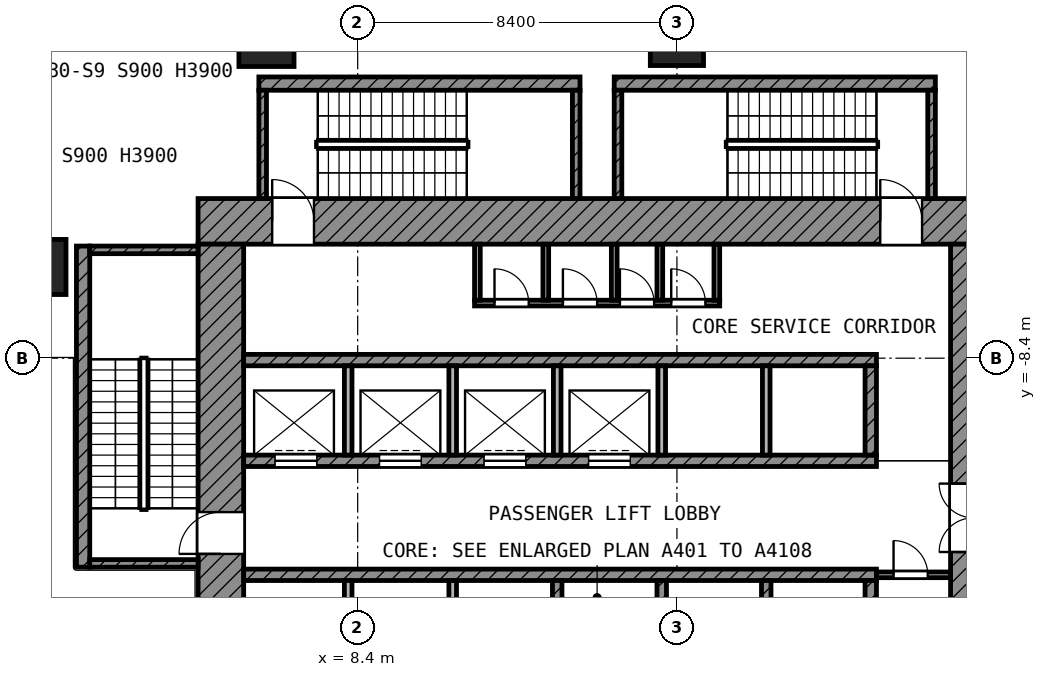
"""IFC4 building model, lengths in metres.
Left out: names, types, materials, properties, quantities, classifications, styles, units other than length and angle.
Written with IfcOpenShell. Run it as: python <this file> out.ifc"""

import sys

from ifc_helpers import new_model, si_unit, direction, frame, frame_2d, origin, origin_2d, place, context, subcontext, project, spatial, rectangle, extrude, element, fill, save


model = new_model("IFC4")
c1 = context("Model", 3, precision=1e-05, world=origin(), true_north=direction((0.0, 1.0)))
c2 = subcontext(c1, "Body", "Model", "MODEL_VIEW")
j1 = project(units=[si_unit("LENGTHUNIT", "METRE"), si_unit("PLANEANGLEUNIT", "RADIAN")], contexts=[c1])
p1 = place(None, origin())
s1 = spatial("IfcSite", under=j1, at=p1, CompositionType="ELEMENT")
p2 = place(p1, origin())
s2 = spatial("IfcBuilding", under=s1, at=p2, CompositionType="ELEMENT")
p3 = place(p2, frame((0.0, 0.0, 29.0)))
s3 = spatial("IfcBuildingStorey", under=s2, at=p3, CompositionType="ELEMENT", Elevation=29.0)
p4 = place(p3, frame((6.0, 0.0, 0.0), z_axis=(0.0, 0.0, 1.0), x_axis=(1.0, 0.0, 0.0)))
e1 = element("IfcColumn", 1, at=p4, inside=s3, PredefinedType="COLUMN", context=c2, shape_type="SweptSolid", body=[
    extrude(rectangle(XDim=1.45, YDim=1.45, at=origin_2d()), origin(), (0.0, 0.0, 1.0), 5.2),
])
p5 = place(p3, frame((16.8, 0.0, 0.0), z_axis=(0.0, 0.0, 1.0), x_axis=(1.0, 0.0, 0.0)))
e2 = element("IfcColumn", 2, at=p5, inside=s3, PredefinedType="COLUMN", context=c2, shape_type="SweptSolid", body=[
    extrude(rectangle(XDim=1.4, YDim=1.4, at=origin_2d()), origin(), (0.0, 0.0, 1.0), 5.2),
])
p6 = place(p3, frame((0.0, -6.0, 0.0), z_axis=(0.0, 0.0, 1.0), x_axis=(1.0, 0.0, 0.0)))
e3 = element("IfcColumn", 3, at=p6, inside=s3, PredefinedType="COLUMN", context=c2, shape_type="SweptSolid", body=[
    extrude(rectangle(XDim=1.45, YDim=1.45, at=origin_2d()), origin(), (0.0, 0.0, 1.0), 5.2),
])
p7 = place(p3, frame((2.062, 3.85, 0.0), z_axis=(0.0, 0.0, 1.0), x_axis=(-0.707106781187, -0.707106781187, 0.0)))
e4 = element("IfcWall", 4, at=p7, inside=s3, PredefinedType="SOLIDWALL", context=c2, shape_type="SweptSolid", body=[
    extrude(rectangle(XDim=8.361, YDim=0.3, at=frame_2d((4.181, 0.0))), origin(), (0.0, 0.0, 1.0), 4.7),
])
p8 = place(p7, frame((0.259, 0.0, 0.9)))
e5 = element("IfcOpeningElement", 5, at=p8, cuts=e4, PredefinedType="OPENING", context=c2, shape_type="SweptSolid", body=[
    extrude(rectangle(XDim=3.6, YDim=3.0, at=frame_2d((1.8, 1.5))), frame((0.0, 0.16, 0.0), z_axis=(0.0, -1.0, 0.0), x_axis=(1.0, 0.0, 0.0)), (0.0, 0.0, 1.0), 0.32),
])
p9 = place(p7, frame((4.502, 0.0, 0.9)))
e6 = element("IfcOpeningElement", 6, at=p9, cuts=e4, PredefinedType="OPENING", context=c2, shape_type="SweptSolid", body=[
    extrude(rectangle(XDim=3.6, YDim=3.0, at=frame_2d((1.8, 1.5))), frame((0.0, 0.16, 0.0), z_axis=(0.0, -1.0, 0.0), x_axis=(1.0, 0.0, 0.0)), (0.0, 0.0, 1.0), 0.32),
])
p10 = place(p3, frame((4.2, -4.8, 0.0), z_axis=(0.0, 0.0, 1.0), x_axis=(1.0, 0.0, 0.0)))
e7 = element("IfcWall", 7, at=p10, inside=s3, PredefinedType="SHEAR", context=c2, shape_type="SweptSolid", body=[
    extrude(rectangle(XDim=21.0, YDim=1.2, at=frame_2d((10.5, 0.0))), origin(), (0.0, 0.0, 1.0), 4.7),
])
p11 = place(p10, frame((1.95, 0.0, 0.0)))
e8 = element("IfcOpeningElement", 8, at=p11, cuts=e7, PredefinedType="OPENING", context=c2, shape_type="SweptSolid", body=[
    extrude(rectangle(XDim=1.1, YDim=2.1, at=frame_2d((0.55, 1.05))), frame((0.0, 0.61, 0.0), z_axis=(0.0, -1.0, 0.0), x_axis=(1.0, 0.0, 0.0)), (0.0, 0.0, 1.0), 1.22),
])
p12 = place(p10, frame((17.95, 0.0, 0.0)))
e9 = element("IfcOpeningElement", 9, at=p12, cuts=e7, PredefinedType="OPENING", context=c2, shape_type="SweptSolid", body=[
    extrude(rectangle(XDim=1.1, YDim=2.1, at=frame_2d((0.55, 1.05))), frame((0.0, 0.61, 0.0), z_axis=(0.0, -1.0, 0.0), x_axis=(1.0, 0.0, 0.0)), (0.0, 0.0, 1.0), 1.22),
])
p13 = place(p3, frame((4.8, -25.2, 0.0), z_axis=(0.0, 0.0, 1.0), x_axis=(0.0, 1.0, 0.0)))
e10 = element("IfcWall", 10, at=p13, inside=s3, PredefinedType="SHEAR", context=c2, shape_type="SweptSolid", body=[
    extrude(rectangle(XDim=19.8, YDim=1.2, at=frame_2d((9.9, 0.0))), origin(), (0.0, 0.0, 1.0), 4.7),
])
p14 = place(p13, frame((11.65, 0.0, 0.0)))
e11 = element("IfcOpeningElement", 11, at=p14, cuts=e10, PredefinedType="OPENING", context=c2, shape_type="SweptSolid", body=[
    extrude(rectangle(XDim=1.1, YDim=2.1, at=frame_2d((0.55, 1.05))), frame((0.0, 0.61, 0.0), z_axis=(0.0, -1.0, 0.0), x_axis=(1.0, 0.0, 0.0)), (0.0, 0.0, 1.0), 1.22),
])
p15 = place(p13, frame((2.35, 0.0, 0.0)))
e12 = element("IfcOpeningElement", 12, at=p15, cuts=e10, PredefinedType="OPENING", context=c2, shape_type="SweptSolid", body=[
    extrude(rectangle(XDim=1.1, YDim=2.1, at=frame_2d((0.55, 1.05))), frame((0.0, 0.61, 0.0), z_axis=(0.0, -1.0, 0.0), x_axis=(1.0, 0.0, 0.0)), (0.0, 0.0, 1.0), 1.22),
])
p16 = place(p3, frame((24.6, -24.0, 0.0), z_axis=(0.0, 0.0, 1.0), x_axis=(0.0, 1.0, 0.0)))
e13 = element("IfcWall", 13, at=p16, inside=s3, PredefinedType="SHEAR", context=c2, shape_type="SweptSolid", body=[
    extrude(rectangle(XDim=18.6, YDim=1.2, at=frame_2d((9.3, 0.0))), origin(), (0.0, 0.0, 1.0), 4.7),
])
p17 = place(p16, frame((10.5, 0.0, 0.0)))
e14 = element("IfcOpeningElement", 14, at=p17, cuts=e13, PredefinedType="OPENING", context=c2, shape_type="SweptSolid", body=[
    extrude(rectangle(XDim=1.8, YDim=2.1, at=frame_2d((0.9, 1.05))), frame((0.0, 0.61, 0.0), z_axis=(0.0, -1.0, 0.0), x_axis=(1.0, 0.0, 0.0)), (0.0, 0.0, 1.0), 1.22),
])
p18 = place(p3, frame((5.4, -8.45, 0.0), z_axis=(0.0, 0.0, 1.0), x_axis=(1.0, 0.0, 0.0)))
e15 = element("IfcWall", 15, at=p18, inside=s3, PredefinedType="SHEAR", context=c2, shape_type="SweptSolid", body=[
    extrude(rectangle(XDim=16.65, YDim=0.3, at=frame_2d((8.325, 0.0))), origin(), (0.0, 0.0, 1.0), 4.7),
])
p19 = place(p3, frame((5.4, -11.1, 0.0), z_axis=(0.0, 0.0, 1.0), x_axis=(1.0, 0.0, 0.0)))
e16 = element("IfcWall", 16, at=p19, inside=s3, PredefinedType="SHEAR", context=c2, shape_type="SweptSolid", body=[
    extrude(rectangle(XDim=16.65, YDim=0.3, at=frame_2d((8.325, 0.0))), origin(), (0.0, 0.0, 1.0), 4.7),
])
p20 = place(p19, frame((0.825, 0.0, 0.0)))
e17 = element("IfcOpeningElement", 17, at=p20, cuts=e16, PredefinedType="OPENING", context=c2, shape_type="SweptSolid", body=[
    extrude(rectangle(XDim=1.1, YDim=2.1, at=frame_2d((0.55, 1.05))), frame((0.0, 0.16, 0.0), z_axis=(0.0, -1.0, 0.0), x_axis=(1.0, 0.0, 0.0)), (0.0, 0.0, 1.0), 0.32),
])
p21 = place(p19, frame((3.575, 0.0, 0.0)))
e18 = element("IfcOpeningElement", 18, at=p21, cuts=e16, PredefinedType="OPENING", context=c2, shape_type="SweptSolid", body=[
    extrude(rectangle(XDim=1.1, YDim=2.1, at=frame_2d((0.55, 1.05))), frame((0.0, 0.16, 0.0), z_axis=(0.0, -1.0, 0.0), x_axis=(1.0, 0.0, 0.0)), (0.0, 0.0, 1.0), 0.32),
])
p22 = place(p19, frame((6.325, 0.0, 0.0)))
e19 = element("IfcOpeningElement", 19, at=p22, cuts=e16, PredefinedType="OPENING", context=c2, shape_type="SweptSolid", body=[
    extrude(rectangle(XDim=1.1, YDim=2.1, at=frame_2d((0.55, 1.05))), frame((0.0, 0.16, 0.0), z_axis=(0.0, -1.0, 0.0), x_axis=(1.0, 0.0, 0.0)), (0.0, 0.0, 1.0), 0.32),
])
p23 = place(p19, frame((9.075, 0.0, 0.0)))
e20 = element("IfcOpeningElement", 20, at=p23, cuts=e16, PredefinedType="OPENING", context=c2, shape_type="SweptSolid", body=[
    extrude(rectangle(XDim=1.1, YDim=2.1, at=frame_2d((0.55, 1.05))), frame((0.0, 0.16, 0.0), z_axis=(0.0, -1.0, 0.0), x_axis=(1.0, 0.0, 0.0)), (0.0, 0.0, 1.0), 0.32),
])
p24 = place(p3, frame((5.4, -14.1, 0.0), z_axis=(0.0, 0.0, 1.0), x_axis=(1.0, 0.0, 0.0)))
e21 = element("IfcWall", 21, at=p24, inside=s3, PredefinedType="SHEAR", context=c2, shape_type="SweptSolid", body=[
    extrude(rectangle(XDim=16.65, YDim=0.3, at=frame_2d((8.325, 0.0))), origin(), (0.0, 0.0, 1.0), 4.7),
])
p25 = place(p3, frame((21.9, -10.95, 0.0), z_axis=(0.0, 0.0, 1.0), x_axis=(0.0, 1.0, 0.0)))
e22 = element("IfcWall", 22, at=p25, inside=s3, PredefinedType="SHEAR", context=c2, shape_type="SweptSolid", body=[
    extrude(rectangle(XDim=2.35, YDim=0.3, at=frame_2d((1.175, 0.0))), origin(), (0.0, 0.0, 1.0), 4.7),
])
p26 = place(p3, frame((21.9, -16.6, 0.0), z_axis=(0.0, 0.0, 1.0), x_axis=(0.0, 1.0, 0.0)))
e23 = element("IfcWall", 23, at=p26, inside=s3, PredefinedType="SHEAR", context=c2, shape_type="SweptSolid", body=[
    extrude(rectangle(XDim=2.35, YDim=0.3, at=frame_2d((1.175, 0.0))), origin(), (0.0, 0.0, 1.0), 4.7),
])
for number, where, z_axis, x_axis in (
    (24, (8.15, -10.95, 0.0), (0.0, 0.0, 1.0), (0.0, 1.0, 0.0)),
    (25, (10.9, -10.95, 0.0), (0.0, 0.0, 1.0), (0.0, 1.0, 0.0)),
    (26, (13.65, -10.95, 0.0), (0.0, 0.0, 1.0), (0.0, 1.0, 0.0)),
    (27, (16.4, -10.95, 0.0), (0.0, 0.0, 1.0), (0.0, 1.0, 0.0)),
    (28, (19.15, -10.95, 0.0), (0.0, 0.0, 1.0), (0.0, 1.0, 0.0)),
):
    element("IfcWall", number, at=place(p3, frame(where, z_axis=z_axis, x_axis=x_axis)), inside=s3, PredefinedType="PARTITIONING", context=c2, shape_type="SweptSolid", body=[
        extrude(rectangle(XDim=2.35, YDim=0.2, at=frame_2d((1.175, 0.0))), origin(), (0.0, 0.0, 1.0), 4.7),
    ])
for number, where, z_axis, x_axis in (
    (29, (8.15, -16.6, 0.0), (0.0, 0.0, 1.0), (0.0, 1.0, 0.0)),
    (30, (10.9, -16.6, 0.0), (0.0, 0.0, 1.0), (0.0, 1.0, 0.0)),
):
    element("IfcWall", number, at=place(p3, frame(where, z_axis=z_axis, x_axis=x_axis)), inside=s3, PredefinedType="PARTITIONING", context=c2, shape_type="SweptSolid", body=[
        extrude(rectangle(XDim=2.35, YDim=0.2, at=frame_2d((1.175, 0.0))), origin(), (0.0, 0.0, 1.0), 4.7),
    ])
for number, where, z_axis, x_axis in (
    (31, (13.65, -16.6, 0.0), (0.0, 0.0, 1.0), (0.0, 1.0, 0.0)),
    (32, (16.4, -16.6, 0.0), (0.0, 0.0, 1.0), (0.0, 1.0, 0.0)),
    (33, (19.15, -16.6, 0.0), (0.0, 0.0, 1.0), (0.0, 1.0, 0.0)),
):
    element("IfcWall", number, at=place(p3, frame(where, z_axis=z_axis, x_axis=x_axis)), inside=s3, PredefinedType="SHEAR", context=c2, shape_type="SweptSolid", body=[
        extrude(rectangle(XDim=2.35, YDim=0.25, at=frame_2d((1.175, 0.0))), origin(), (0.0, 0.0, 1.0), 4.7),
    ])
p27 = place(p3, frame((22.05, -14.1, 0.0), z_axis=(0.0, 0.0, 1.0), x_axis=(1.0, 0.0, 0.0)))
e34 = element("IfcWall", 34, at=p27, inside=s3, PredefinedType="PARTITIONING", context=c2, shape_type="SweptSolid", body=[
    extrude(rectangle(XDim=1.95, YDim=0.15, at=frame_2d((0.975, 0.0))), origin(), (0.0, 0.0, 1.0), 4.7),
])
p28 = place(p27, frame((0.45, 0.0, 0.0)))
e35 = element("IfcOpeningElement", 35, at=p28, cuts=e34, PredefinedType="OPENING", context=c2, shape_type="SweptSolid", body=[
    extrude(rectangle(XDim=0.9, YDim=2.1, at=frame_2d((0.45, 1.05))), frame((0.0, 0.085, 0.0), z_axis=(0.0, -1.0, 0.0), x_axis=(1.0, 0.0, 0.0)), (0.0, 0.0, 1.0), 0.17),
])
p29 = place(p3, frame((11.475, -6.95, 0.0), z_axis=(0.0, 0.0, 1.0), x_axis=(1.0, 0.0, 0.0)))
e36 = element("IfcWall", 36, at=p29, inside=s3, PredefinedType="PARTITIONING", context=c2, shape_type="SweptSolid", body=[
    extrude(rectangle(XDim=6.45, YDim=0.15, at=frame_2d((3.225, 0.0))), origin(), (0.0, 0.0, 1.0), 4.7),
])
p30 = place(p29, frame((0.525, 0.0, 0.0)))
e37 = element("IfcOpeningElement", 37, at=p30, cuts=e36, PredefinedType="OPENING", context=c2, shape_type="SweptSolid", body=[
    extrude(rectangle(XDim=0.9, YDim=2.1, at=frame_2d((0.45, 1.05))), frame((0.0, 0.085, 0.0), z_axis=(0.0, -1.0, 0.0), x_axis=(1.0, 0.0, 0.0)), (0.0, 0.0, 1.0), 0.17),
])
p31 = place(p29, frame((2.325, 0.0, 0.0)))
e38 = element("IfcOpeningElement", 38, at=p31, cuts=e36, PredefinedType="OPENING", context=c2, shape_type="SweptSolid", body=[
    extrude(rectangle(XDim=0.9, YDim=2.1, at=frame_2d((0.45, 1.05))), frame((0.0, 0.085, 0.0), z_axis=(0.0, -1.0, 0.0), x_axis=(1.0, 0.0, 0.0)), (0.0, 0.0, 1.0), 0.17),
])
p32 = place(p29, frame((3.825, 0.0, 0.0)))
e39 = element("IfcOpeningElement", 39, at=p32, cuts=e36, PredefinedType="OPENING", context=c2, shape_type="SweptSolid", body=[
    extrude(rectangle(XDim=0.9, YDim=2.1, at=frame_2d((0.45, 1.05))), frame((0.0, 0.085, 0.0), z_axis=(0.0, -1.0, 0.0), x_axis=(1.0, 0.0, 0.0)), (0.0, 0.0, 1.0), 0.17),
])
p33 = place(p29, frame((5.175, 0.0, 0.0)))
e40 = element("IfcOpeningElement", 40, at=p33, cuts=e36, PredefinedType="OPENING", context=c2, shape_type="SweptSolid", body=[
    extrude(rectangle(XDim=0.9, YDim=2.1, at=frame_2d((0.45, 1.05))), frame((0.0, 0.085, 0.0), z_axis=(0.0, -1.0, 0.0), x_axis=(1.0, 0.0, 0.0)), (0.0, 0.0, 1.0), 0.17),
])
for number, where, z_axis, x_axis in (
    (41, (11.55, -6.875, 0.0), (0.0, 0.0, 1.0), (0.0, 1.0, 0.0)),
    (42, (13.35, -6.875, 0.0), (0.0, 0.0, 1.0), (0.0, 1.0, 0.0)),
    (43, (15.15, -6.875, 0.0), (0.0, 0.0, 1.0), (0.0, 1.0, 0.0)),
    (44, (16.35, -6.875, 0.0), (0.0, 0.0, 1.0), (0.0, 1.0, 0.0)),
    (45, (17.85, -6.875, 0.0), (0.0, 0.0, 1.0), (0.0, 1.0, 0.0)),
):
    element("IfcWall", number, at=place(p3, frame(where, z_axis=z_axis, x_axis=x_axis)), inside=s3, PredefinedType="PARTITIONING", context=c2, shape_type="SweptSolid", body=[
        extrude(rectangle(XDim=1.475, YDim=0.15, at=frame_2d((0.738, 0.0))), origin(), (0.0, 0.0, 1.0), 4.7),
    ])
p34 = place(p3, frame((1.175, -13.9, 0.0), z_axis=(0.0, 0.0, 1.0), x_axis=(0.0, 1.0, 0.0)))
e46 = element("IfcWall", 46, at=p34, inside=s3, PredefinedType="SHEAR", context=c2, shape_type="SweptSolid", body=[
    extrude(rectangle(XDim=8.45, YDim=0.35, at=frame_2d((4.225, 0.0))), origin(), (0.0, 0.0, 1.0), 4.7),
])
for number, where, z_axis, x_axis in (
    (47, (1.35, -5.55, 0.0), (0.0, 0.0, 1.0), (1.0, 0.0, 0.0)),
    (48, (1.35, -13.8, 0.0), (0.0, 0.0, 1.0), (1.0, 0.0, 0.0)),
):
    element("IfcWall", number, at=place(p3, frame(where, z_axis=z_axis, x_axis=x_axis)), inside=s3, PredefinedType="SHEAR", context=c2, shape_type="SweptSolid", body=[
        extrude(rectangle(XDim=2.85, YDim=0.2, at=frame_2d((1.425, 0.0))), origin(), (0.0, 0.0, 1.0), 4.7),
    ])
p35 = place(p3, frame((5.8, -1.175, 0.0), z_axis=(0.0, 0.0, 1.0), x_axis=(1.0, 0.0, 0.0)))
e49 = element("IfcWall", 49, at=p35, inside=s3, PredefinedType="SHEAR", context=c2, shape_type="SweptSolid", body=[
    extrude(rectangle(XDim=8.45, YDim=0.35, at=frame_2d((4.225, 0.0))), origin(), (0.0, 0.0, 1.0), 4.7),
])
for number, where, z_axis, x_axis in (
    (50, (5.9, -4.2, 0.0), (0.0, 0.0, 1.0), (0.0, 1.0, 0.0)),
    (51, (14.15, -4.2, 0.0), (0.0, 0.0, 1.0), (0.0, 1.0, 0.0)),
):
    element("IfcWall", number, at=place(p3, frame(where, z_axis=z_axis, x_axis=x_axis)), inside=s3, PredefinedType="SHEAR", context=c2, shape_type="SweptSolid", body=[
        extrude(rectangle(XDim=2.85, YDim=0.2, at=frame_2d((1.425, 0.0))), origin(), (0.0, 0.0, 1.0), 4.7),
    ])
p36 = place(p3, frame((15.15, -1.175, 0.0), z_axis=(0.0, 0.0, 1.0), x_axis=(1.0, 0.0, 0.0)))
e52 = element("IfcWall", 52, at=p36, inside=s3, PredefinedType="SHEAR", context=c2, shape_type="SweptSolid", body=[
    extrude(rectangle(XDim=8.45, YDim=0.35, at=frame_2d((4.225, 0.0))), origin(), (0.0, 0.0, 1.0), 4.7),
])
for number, where, z_axis, x_axis in (
    (53, (15.25, -4.2, 0.0), (0.0, 0.0, 1.0), (0.0, 1.0, 0.0)),
    (54, (23.5, -4.2, 0.0), (0.0, 0.0, 1.0), (0.0, 1.0, 0.0)),
):
    element("IfcWall", number, at=place(p3, frame(where, z_axis=z_axis, x_axis=x_axis)), inside=s3, PredefinedType="SHEAR", context=c2, shape_type="SweptSolid", body=[
        extrude(rectangle(XDim=2.85, YDim=0.2, at=frame_2d((1.425, 0.0))), origin(), (0.0, 0.0, 1.0), 4.7),
    ])
p37 = place(p20, origin())
e55 = element("IfcDoor", 55, at=p37, inside=s3, OperationType="DOUBLE_DOOR_SLIDING", PredefinedType="DOOR", context=c2, shape_type="SweptSolid", body=[
    extrude(rectangle(XDim=1.1, YDim=2.1, at=frame_2d((0.55, 1.05))), frame((0.0, 0.025, 0.0), z_axis=(0.0, -1.0, 0.0), x_axis=(1.0, 0.0, 0.0)), (0.0, 0.0, 1.0), 0.05),
])
fill(e17, e55)
p38 = place(p21, origin())
e56 = element("IfcDoor", 56, at=p38, inside=s3, OperationType="DOUBLE_DOOR_SLIDING", PredefinedType="DOOR", context=c2, shape_type="SweptSolid", body=[
    extrude(rectangle(XDim=1.1, YDim=2.1, at=frame_2d((0.55, 1.05))), frame((0.0, 0.025, 0.0), z_axis=(0.0, -1.0, 0.0), x_axis=(1.0, 0.0, 0.0)), (0.0, 0.0, 1.0), 0.05),
])
fill(e18, e56)
p39 = place(p22, origin())
e57 = element("IfcDoor", 57, at=p39, inside=s3, OperationType="DOUBLE_DOOR_SLIDING", PredefinedType="DOOR", context=c2, shape_type="SweptSolid", body=[
    extrude(rectangle(XDim=1.1, YDim=2.1, at=frame_2d((0.55, 1.05))), frame((0.0, 0.025, 0.0), z_axis=(0.0, -1.0, 0.0), x_axis=(1.0, 0.0, 0.0)), (0.0, 0.0, 1.0), 0.05),
])
fill(e19, e57)
p40 = place(p23, origin())
e58 = element("IfcDoor", 58, at=p40, inside=s3, OperationType="DOUBLE_DOOR_SLIDING", PredefinedType="DOOR", context=c2, shape_type="SweptSolid", body=[
    extrude(rectangle(XDim=1.1, YDim=2.1, at=frame_2d((0.55, 1.05))), frame((0.0, 0.025, 0.0), z_axis=(0.0, -1.0, 0.0), x_axis=(1.0, 0.0, 0.0)), (0.0, 0.0, 1.0), 0.05),
])
fill(e20, e58)
p41 = place(p14, origin())
e59 = element("IfcDoor", 59, at=p41, inside=s3, OperationType="SINGLE_SWING_LEFT", PredefinedType="DOOR", context=c2, shape_type="SweptSolid", body=[
    extrude(rectangle(XDim=1.1, YDim=2.1, at=frame_2d((0.55, 1.05))), frame((0.0, 0.025, 0.0), z_axis=(0.0, -1.0, 0.0), x_axis=(1.0, 0.0, 0.0)), (0.0, 0.0, 1.0), 0.05),
])
fill(e11, e59)
p42 = place(p11, origin())
e60 = element("IfcDoor", 60, at=p42, inside=s3, OperationType="SINGLE_SWING_LEFT", PredefinedType="DOOR", context=c2, shape_type="SweptSolid", body=[
    extrude(rectangle(XDim=1.1, YDim=2.1, at=frame_2d((0.55, 1.05))), frame((0.0, 0.025, 0.0), z_axis=(0.0, -1.0, 0.0), x_axis=(1.0, 0.0, 0.0)), (0.0, 0.0, 1.0), 0.05),
])
fill(e8, e60)
p43 = place(p12, origin())
e61 = element("IfcDoor", 61, at=p43, inside=s3, OperationType="SINGLE_SWING_LEFT", PredefinedType="DOOR", context=c2, shape_type="SweptSolid", body=[
    extrude(rectangle(XDim=1.1, YDim=2.1, at=frame_2d((0.55, 1.05))), frame((0.0, 0.025, 0.0), z_axis=(0.0, -1.0, 0.0), x_axis=(1.0, 0.0, 0.0)), (0.0, 0.0, 1.0), 0.05),
])
fill(e9, e61)
p44 = place(p30, origin())
e62 = element("IfcDoor", 62, at=p44, inside=s3, OperationType="SINGLE_SWING_LEFT", PredefinedType="DOOR", context=c2, shape_type="SweptSolid", body=[
    extrude(rectangle(XDim=0.9, YDim=2.1, at=frame_2d((0.45, 1.05))), frame((0.0, 0.025, 0.0), z_axis=(0.0, -1.0, 0.0), x_axis=(1.0, 0.0, 0.0)), (0.0, 0.0, 1.0), 0.05),
])
fill(e37, e62)
p45 = place(p31, origin())
e63 = element("IfcDoor", 63, at=p45, inside=s3, OperationType="SINGLE_SWING_LEFT", PredefinedType="DOOR", context=c2, shape_type="SweptSolid", body=[
    extrude(rectangle(XDim=0.9, YDim=2.1, at=frame_2d((0.45, 1.05))), frame((0.0, 0.025, 0.0), z_axis=(0.0, -1.0, 0.0), x_axis=(1.0, 0.0, 0.0)), (0.0, 0.0, 1.0), 0.05),
])
fill(e38, e63)
p46 = place(p32, origin())
e64 = element("IfcDoor", 64, at=p46, inside=s3, OperationType="SINGLE_SWING_LEFT", PredefinedType="DOOR", context=c2, shape_type="SweptSolid", body=[
    extrude(rectangle(XDim=0.9, YDim=2.1, at=frame_2d((0.45, 1.05))), frame((0.0, 0.025, 0.0), z_axis=(0.0, -1.0, 0.0), x_axis=(1.0, 0.0, 0.0)), (0.0, 0.0, 1.0), 0.05),
])
fill(e39, e64)
p47 = place(p33, origin())
e65 = element("IfcDoor", 65, at=p47, inside=s3, OperationType="SINGLE_SWING_LEFT", PredefinedType="DOOR", context=c2, shape_type="SweptSolid", body=[
    extrude(rectangle(XDim=0.9, YDim=2.1, at=frame_2d((0.45, 1.05))), frame((0.0, 0.025, 0.0), z_axis=(0.0, -1.0, 0.0), x_axis=(1.0, 0.0, 0.0)), (0.0, 0.0, 1.0), 0.05),
])
fill(e40, e65)
p48 = place(p28, origin())
e66 = element("IfcDoor", 66, at=p48, inside=s3, OperationType="SINGLE_SWING_LEFT", PredefinedType="DOOR", context=c2, shape_type="SweptSolid", body=[
    extrude(rectangle(XDim=0.9, YDim=2.1, at=frame_2d((0.45, 1.05))), frame((0.0, 0.025, 0.0), z_axis=(0.0, -1.0, 0.0), x_axis=(1.0, 0.0, 0.0)), (0.0, 0.0, 1.0), 0.05),
])
fill(e35, e66)
save(model, sys.argv[1])
